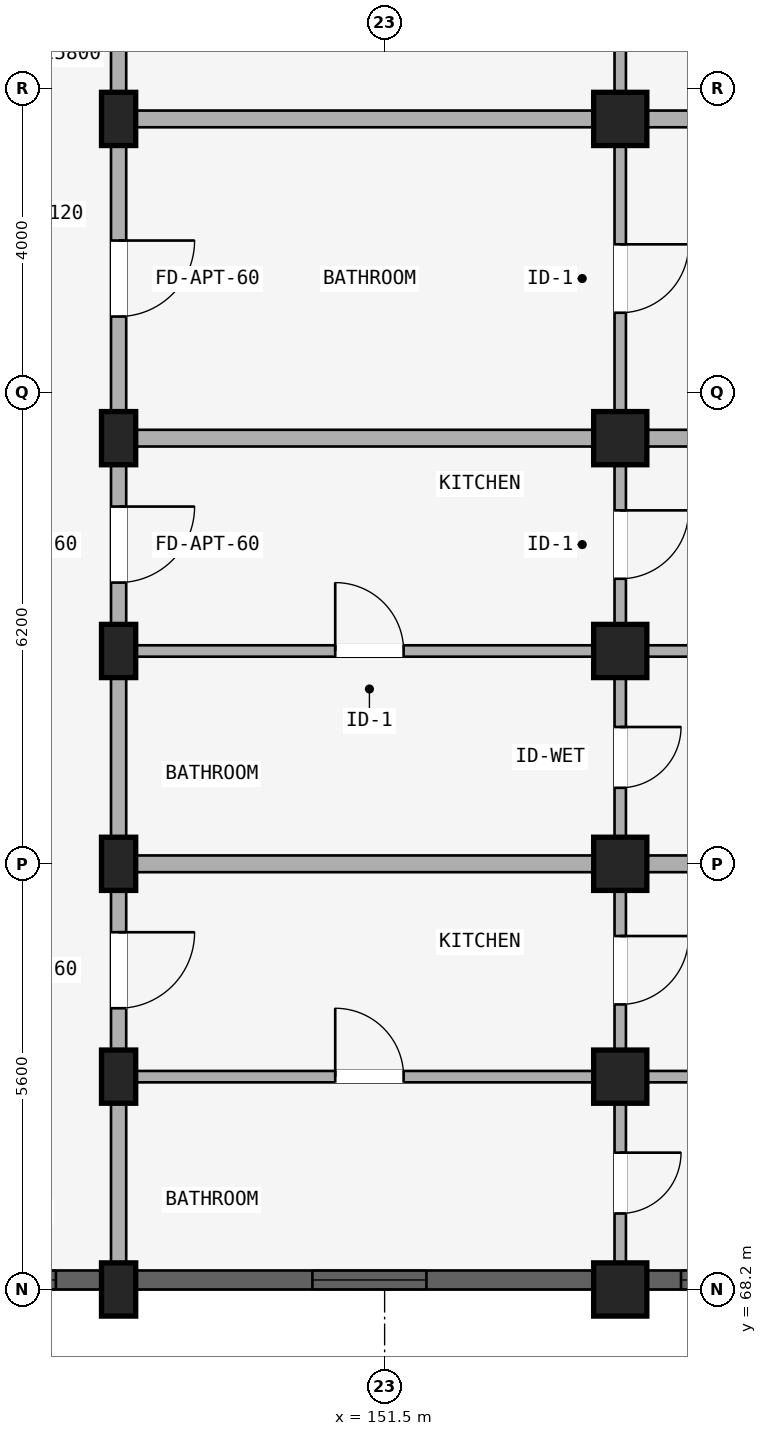
"""IFC4 building model, lengths in metres.
Left out: names, types, materials, properties, quantities, classifications, styles, units other than length and angle.
Written with IfcOpenShell. Run it as: python <this file> out.ifc"""

import sys

from ifc_helpers import new_model, si_unit, direction, frame, frame_2d, origin, origin_2d, place, context, subcontext, project, spatial, rectangle, extrude, element, fill, save


model = new_model("IFC4")
c1 = context("Model", 3, precision=1e-05, world=origin(), true_north=direction((0.0, 1.0)))
c2 = subcontext(c1, "Body", "Model", "MODEL_VIEW")
j1 = project(units=[si_unit("LENGTHUNIT", "METRE"), si_unit("PLANEANGLEUNIT", "RADIAN")], contexts=[c1])
p1 = place(None, origin())
s1 = spatial("IfcSite", under=j1, at=p1, CompositionType="ELEMENT")
p2 = place(p1, origin())
s2 = spatial("IfcBuilding", under=s1, at=p2, CompositionType="ELEMENT")
p3 = place(p2, frame((0.0, 0.0, 21.3)))
s3 = spatial("IfcBuildingStorey", under=s2, at=p3, CompositionType="ELEMENT", Elevation=21.3)
p4 = place(p3, frame((148.0, 83.6, 0.0), z_axis=(0.0, 0.0, 1.0), x_axis=(1.0, 0.0, 0.0)))
e1 = element("IfcColumn", 1, at=p4, inside=s3, PredefinedType="COLUMN", context=c2, shape_type="SweptSolid", body=[
    extrude(rectangle(XDim=0.45, YDim=0.7, at=origin_2d()), origin(), (0.0, 0.0, 1.0), 2.93),
])
p5 = place(p3, frame((154.6, 83.6, 0.0), z_axis=(0.0, 0.0, 1.0), x_axis=(1.0, 0.0, 0.0)))
e2 = element("IfcColumn", 2, at=p5, inside=s3, PredefinedType="COLUMN", context=c2, shape_type="SweptSolid", body=[
    extrude(rectangle(XDim=0.7, YDim=0.7, at=origin_2d()), origin(), (0.0, 0.0, 1.0), 2.93),
])
p6 = place(p3, frame((148.0, 79.4, 0.0), z_axis=(0.0, 0.0, 1.0), x_axis=(1.0, 0.0, 0.0)))
e3 = element("IfcColumn", 3, at=p6, inside=s3, PredefinedType="COLUMN", context=c2, shape_type="SweptSolid", body=[
    extrude(rectangle(XDim=0.45, YDim=0.7, at=origin_2d()), origin(), (0.0, 0.0, 1.0), 2.93),
])
p7 = place(p3, frame((154.6, 79.4, 0.0), z_axis=(0.0, 0.0, 1.0), x_axis=(1.0, 0.0, 0.0)))
e4 = element("IfcColumn", 4, at=p7, inside=s3, PredefinedType="COLUMN", context=c2, shape_type="SweptSolid", body=[
    extrude(rectangle(XDim=0.7, YDim=0.7, at=origin_2d()), origin(), (0.0, 0.0, 1.0), 2.93),
])
p8 = place(p3, frame((148.0, 76.6, 0.0), z_axis=(0.0, 0.0, 1.0), x_axis=(1.0, 0.0, 0.0)))
e5 = element("IfcColumn", 5, at=p8, inside=s3, PredefinedType="COLUMN", context=c2, shape_type="SweptSolid", body=[
    extrude(rectangle(XDim=0.45, YDim=0.7, at=origin_2d()), origin(), (0.0, 0.0, 1.0), 2.93),
])
p9 = place(p3, frame((154.6, 76.6, 0.0), z_axis=(0.0, 0.0, 1.0), x_axis=(1.0, 0.0, 0.0)))
e6 = element("IfcColumn", 6, at=p9, inside=s3, PredefinedType="COLUMN", context=c2, shape_type="SweptSolid", body=[
    extrude(rectangle(XDim=0.7, YDim=0.7, at=origin_2d()), origin(), (0.0, 0.0, 1.0), 2.93),
])
p10 = place(p3, frame((148.0, 73.8, 0.0), z_axis=(0.0, 0.0, 1.0), x_axis=(1.0, 0.0, 0.0)))
e7 = element("IfcColumn", 7, at=p10, inside=s3, PredefinedType="COLUMN", context=c2, shape_type="SweptSolid", body=[
    extrude(rectangle(XDim=0.45, YDim=0.7, at=origin_2d()), origin(), (0.0, 0.0, 1.0), 2.93),
])
p11 = place(p3, frame((154.6, 73.8, 0.0), z_axis=(0.0, 0.0, 1.0), x_axis=(1.0, 0.0, 0.0)))
e8 = element("IfcColumn", 8, at=p11, inside=s3, PredefinedType="COLUMN", context=c2, shape_type="SweptSolid", body=[
    extrude(rectangle(XDim=0.7, YDim=0.7, at=origin_2d()), origin(), (0.0, 0.0, 1.0), 2.93),
])
p12 = place(p3, frame((148.0, 71.0, 0.0), z_axis=(0.0, 0.0, 1.0), x_axis=(1.0, 0.0, 0.0)))
e9 = element("IfcColumn", 9, at=p12, inside=s3, PredefinedType="COLUMN", context=c2, shape_type="SweptSolid", body=[
    extrude(rectangle(XDim=0.45, YDim=0.7, at=origin_2d()), origin(), (0.0, 0.0, 1.0), 2.93),
])
p13 = place(p3, frame((154.6, 71.0, 0.0), z_axis=(0.0, 0.0, 1.0), x_axis=(1.0, 0.0, 0.0)))
e10 = element("IfcColumn", 10, at=p13, inside=s3, PredefinedType="COLUMN", context=c2, shape_type="SweptSolid", body=[
    extrude(rectangle(XDim=0.7, YDim=0.7, at=origin_2d()), origin(), (0.0, 0.0, 1.0), 2.93),
])
p14 = place(p3, frame((148.0, 68.2, 0.0), z_axis=(0.0, 0.0, 1.0), x_axis=(1.0, 0.0, 0.0)))
e11 = element("IfcColumn", 11, at=p14, inside=s3, PredefinedType="COLUMN", context=c2, shape_type="SweptSolid", body=[
    extrude(rectangle(XDim=0.45, YDim=0.7, at=origin_2d()), origin(), (0.0, 0.0, 1.0), 2.93),
])
p15 = place(p3, frame((154.6, 68.2, 0.0), z_axis=(0.0, 0.0, 1.0), x_axis=(1.0, 0.0, 0.0)))
e12 = element("IfcColumn", 12, at=p15, inside=s3, PredefinedType="COLUMN", context=c2, shape_type="SweptSolid", body=[
    extrude(rectangle(XDim=0.7, YDim=0.7, at=origin_2d()), origin(), (0.0, 0.0, 1.0), 2.93),
])
p16 = place(p3, frame((148.0, 87.65, 0.0), z_axis=(0.0, 0.0, 1.0), x_axis=(0.0, -1.0, 0.0)))
e13 = element("IfcWall", 13, at=p16, inside=s3, PredefinedType="STANDARD", context=c2, shape_type="SweptSolid", body=[
    extrude(rectangle(XDim=4.05, YDim=0.2, at=frame_2d((2.025, 0.0))), origin(), (0.0, 0.0, 1.0), 2.372),
])
p17 = place(p16, frame((1.525, 0.0, 0.0)))
e14 = element("IfcOpeningElement", 14, at=p17, cuts=e13, PredefinedType="OPENING", context=c2, shape_type="SweptSolid", body=[
    extrude(rectangle(XDim=1.0, YDim=2.15, at=frame_2d((0.5, 1.075))), frame((0.0, 0.11, 0.0), z_axis=(0.0, -1.0, 0.0), x_axis=(1.0, 0.0, 0.0)), (0.0, 0.0, 1.0), 0.22),
])
p18 = place(p3, frame((154.6, 87.57, 0.0), z_axis=(0.0, 0.0, 1.0), x_axis=(0.0, -1.0, 0.0)))
e15 = element("IfcWall", 15, at=p18, inside=s3, PredefinedType="PARTITIONING", context=c2, shape_type="SweptSolid", body=[
    extrude(rectangle(XDim=3.89, YDim=0.15, at=frame_2d((1.945, 0.0))), origin(), (0.0, 0.0, 1.0), 2.372),
])
p19 = place(p18, frame((1.495, 0.0, 0.0)))
e16 = element("IfcOpeningElement", 16, at=p19, cuts=e15, PredefinedType="OPENING", context=c2, shape_type="SweptSolid", body=[
    extrude(rectangle(XDim=0.9, YDim=2.1, at=frame_2d((0.45, 1.05))), frame((0.0, 0.085, 0.0), z_axis=(0.0, -1.0, 0.0), x_axis=(1.0, 0.0, 0.0)), (0.0, 0.0, 1.0), 0.17),
])
p20 = place(p3, frame((148.0, 83.6, 0.0), z_axis=(0.0, 0.0, 1.0), x_axis=(0.0, -1.0, 0.0)))
e17 = element("IfcWall", 17, at=p20, inside=s3, PredefinedType="STANDARD", context=c2, shape_type="SweptSolid", body=[
    extrude(rectangle(XDim=4.2, YDim=0.2, at=frame_2d((2.1, 0.0))), origin(), (0.0, 0.0, 1.0), 2.372),
])
p21 = place(p20, frame((1.6, 0.0, 0.0)))
e18 = element("IfcOpeningElement", 18, at=p21, cuts=e17, PredefinedType="OPENING", context=c2, shape_type="SweptSolid", body=[
    extrude(rectangle(XDim=1.0, YDim=2.15, at=frame_2d((0.5, 1.075))), frame((0.0, 0.11, 0.0), z_axis=(0.0, -1.0, 0.0), x_axis=(1.0, 0.0, 0.0)), (0.0, 0.0, 1.0), 0.22),
])
p22 = place(p3, frame((154.6, 83.52, 0.0), z_axis=(0.0, 0.0, 1.0), x_axis=(0.0, -1.0, 0.0)))
e19 = element("IfcWall", 19, at=p22, inside=s3, PredefinedType="PARTITIONING", context=c2, shape_type="SweptSolid", body=[
    extrude(rectangle(XDim=4.04, YDim=0.15, at=frame_2d((2.02, 0.0))), origin(), (0.0, 0.0, 1.0), 2.372),
])
p23 = place(p22, frame((1.57, 0.0, 0.0)))
e20 = element("IfcOpeningElement", 20, at=p23, cuts=e19, PredefinedType="OPENING", context=c2, shape_type="SweptSolid", body=[
    extrude(rectangle(XDim=0.9, YDim=2.1, at=frame_2d((0.45, 1.05))), frame((0.0, 0.085, 0.0), z_axis=(0.0, -1.0, 0.0), x_axis=(1.0, 0.0, 0.0)), (0.0, 0.0, 1.0), 0.17),
])
p24 = place(p3, frame((148.05, 83.6, 0.0), z_axis=(0.0, 0.0, 1.0), x_axis=(1.0, 0.0, 0.0)))
e21 = element("IfcWall", 21, at=p24, inside=s3, PredefinedType="STANDARD", context=c2, shape_type="SweptSolid", body=[
    extrude(rectangle(XDim=17.53, YDim=0.22, at=frame_2d((8.765, 0.0))), origin(), (0.0, 0.0, 1.0), 2.372),
])
p25 = place(p3, frame((148.0, 79.4, 0.0), z_axis=(0.0, 0.0, 1.0), x_axis=(0.0, -1.0, 0.0)))
e22 = element("IfcWall", 22, at=p25, inside=s3, PredefinedType="STANDARD", context=c2, shape_type="SweptSolid", body=[
    extrude(rectangle(XDim=2.8, YDim=0.2, at=frame_2d((1.4, 0.0))), origin(), (0.0, 0.0, 1.0), 2.372),
])
p26 = place(p25, frame((0.9, 0.0, 0.0)))
e23 = element("IfcOpeningElement", 23, at=p26, cuts=e22, PredefinedType="OPENING", context=c2, shape_type="SweptSolid", body=[
    extrude(rectangle(XDim=1.0, YDim=2.15, at=frame_2d((0.5, 1.075))), frame((0.0, 0.11, 0.0), z_axis=(0.0, -1.0, 0.0), x_axis=(1.0, 0.0, 0.0)), (0.0, 0.0, 1.0), 0.22),
])
p27 = place(p3, frame((154.6, 79.32, 0.0), z_axis=(0.0, 0.0, 1.0), x_axis=(0.0, -1.0, 0.0)))
e24 = element("IfcWall", 24, at=p27, inside=s3, PredefinedType="PLUMBINGWALL", context=c2, shape_type="SweptSolid", body=[
    extrude(rectangle(XDim=2.64, YDim=0.15, at=frame_2d((1.32, 0.0))), origin(), (0.0, 0.0, 1.0), 2.372),
])
p28 = place(p27, frame((0.87, 0.0, 0.0)))
e25 = element("IfcOpeningElement", 25, at=p28, cuts=e24, PredefinedType="OPENING", context=c2, shape_type="SweptSolid", body=[
    extrude(rectangle(XDim=0.9, YDim=2.1, at=frame_2d((0.45, 1.05))), frame((0.0, 0.085, 0.0), z_axis=(0.0, -1.0, 0.0), x_axis=(1.0, 0.0, 0.0)), (0.0, 0.0, 1.0), 0.17),
])
p29 = place(p3, frame((148.1, 79.4, 0.0), z_axis=(0.0, 0.0, 1.0), x_axis=(1.0, 0.0, 0.0)))
e26 = element("IfcWall", 26, at=p29, inside=s3, PredefinedType="STANDARD", context=c2, shape_type="SweptSolid", body=[
    extrude(rectangle(XDim=17.42, YDim=0.22, at=frame_2d((8.71, 0.0))), origin(), (0.0, 0.0, 1.0), 2.372),
])
p30 = place(p3, frame((148.0, 76.6, 0.0), z_axis=(0.0, 0.0, 1.0), x_axis=(0.0, -1.0, 0.0)))
e27 = element("IfcWall", 27, at=p30, inside=s3, PredefinedType="STANDARD", context=c2, shape_type="SweptSolid", body=[
    extrude(rectangle(XDim=2.8, YDim=0.2, at=frame_2d((1.4, 0.0))), origin(), (0.0, 0.0, 1.0), 2.372),
])
p31 = place(p3, frame((154.6, 76.52, 0.0), z_axis=(0.0, 0.0, 1.0), x_axis=(0.0, -1.0, 0.0)))
e28 = element("IfcWall", 28, at=p31, inside=s3, PredefinedType="PLUMBINGWALL", context=c2, shape_type="SweptSolid", body=[
    extrude(rectangle(XDim=2.64, YDim=0.15, at=frame_2d((1.32, 0.0))), origin(), (0.0, 0.0, 1.0), 2.372),
])
p32 = place(p31, frame((0.92, 0.0, 0.0)))
e29 = element("IfcOpeningElement", 29, at=p32, cuts=e28, PredefinedType="OPENING", context=c2, shape_type="SweptSolid", body=[
    extrude(rectangle(XDim=0.8, YDim=2.1, at=frame_2d((0.4, 1.05))), frame((0.0, 0.085, 0.0), z_axis=(0.0, -1.0, 0.0), x_axis=(1.0, 0.0, 0.0)), (0.0, 0.0, 1.0), 0.17),
])
p33 = place(p3, frame((148.1, 76.6, 0.0), z_axis=(0.0, 0.0, 1.0), x_axis=(1.0, 0.0, 0.0)))
e30 = element("IfcWall", 30, at=p33, inside=s3, PredefinedType="PARTITIONING", context=c2, shape_type="SweptSolid", body=[
    extrude(rectangle(XDim=17.42, YDim=0.15, at=frame_2d((8.71, 0.0))), origin(), (0.0, 0.0, 1.0), 2.372),
])
p34 = place(p33, frame((2.75, 0.0, 0.0)))
e31 = element("IfcOpeningElement", 31, at=p34, cuts=e30, PredefinedType="OPENING", context=c2, shape_type="SweptSolid", body=[
    extrude(rectangle(XDim=0.9, YDim=2.1, at=frame_2d((0.45, 1.05))), frame((0.0, 0.085, 0.0), z_axis=(0.0, -1.0, 0.0), x_axis=(1.0, 0.0, 0.0)), (0.0, 0.0, 1.0), 0.17),
])
p35 = place(p3, frame((148.0, 73.8, 0.0), z_axis=(0.0, 0.0, 1.0), x_axis=(0.0, -1.0, 0.0)))
e32 = element("IfcWall", 32, at=p35, inside=s3, PredefinedType="STANDARD", context=c2, shape_type="SweptSolid", body=[
    extrude(rectangle(XDim=2.8, YDim=0.2, at=frame_2d((1.4, 0.0))), origin(), (0.0, 0.0, 1.0), 2.372),
])
p36 = place(p35, frame((0.9, 0.0, 0.0)))
e33 = element("IfcOpeningElement", 33, at=p36, cuts=e32, PredefinedType="OPENING", context=c2, shape_type="SweptSolid", body=[
    extrude(rectangle(XDim=1.0, YDim=2.15, at=frame_2d((0.5, 1.075))), frame((0.0, 0.11, 0.0), z_axis=(0.0, -1.0, 0.0), x_axis=(1.0, 0.0, 0.0)), (0.0, 0.0, 1.0), 0.22),
])
p37 = place(p3, frame((154.6, 73.72, 0.0), z_axis=(0.0, 0.0, 1.0), x_axis=(0.0, -1.0, 0.0)))
e34 = element("IfcWall", 34, at=p37, inside=s3, PredefinedType="PLUMBINGWALL", context=c2, shape_type="SweptSolid", body=[
    extrude(rectangle(XDim=2.64, YDim=0.15, at=frame_2d((1.32, 0.0))), origin(), (0.0, 0.0, 1.0), 2.372),
])
p38 = place(p37, frame((0.87, 0.0, 0.0)))
e35 = element("IfcOpeningElement", 35, at=p38, cuts=e34, PredefinedType="OPENING", context=c2, shape_type="SweptSolid", body=[
    extrude(rectangle(XDim=0.9, YDim=2.1, at=frame_2d((0.45, 1.05))), frame((0.0, 0.085, 0.0), z_axis=(0.0, -1.0, 0.0), x_axis=(1.0, 0.0, 0.0)), (0.0, 0.0, 1.0), 0.17),
])
p39 = place(p3, frame((148.1, 73.8, 0.0), z_axis=(0.0, 0.0, 1.0), x_axis=(1.0, 0.0, 0.0)))
e36 = element("IfcWall", 36, at=p39, inside=s3, PredefinedType="STANDARD", context=c2, shape_type="SweptSolid", body=[
    extrude(rectangle(XDim=17.42, YDim=0.22, at=frame_2d((8.71, 0.0))), origin(), (0.0, 0.0, 1.0), 2.372),
])
p40 = place(p3, frame((148.0, 71.0, 0.0), z_axis=(0.0, 0.0, 1.0), x_axis=(0.0, -1.0, 0.0)))
e37 = element("IfcWall", 37, at=p40, inside=s3, PredefinedType="STANDARD", context=c2, shape_type="SweptSolid", body=[
    extrude(rectangle(XDim=2.8, YDim=0.2, at=frame_2d((1.4, 0.0))), origin(), (0.0, 0.0, 1.0), 2.372),
])
p41 = place(p3, frame((154.6, 70.92, 0.0), z_axis=(0.0, 0.0, 1.0), x_axis=(0.0, -1.0, 0.0)))
e38 = element("IfcWall", 38, at=p41, inside=s3, PredefinedType="PLUMBINGWALL", context=c2, shape_type="SweptSolid", body=[
    extrude(rectangle(XDim=2.64, YDim=0.15, at=frame_2d((1.32, 0.0))), origin(), (0.0, 0.0, 1.0), 2.372),
])
p42 = place(p41, frame((0.92, 0.0, 0.0)))
e39 = element("IfcOpeningElement", 39, at=p42, cuts=e38, PredefinedType="OPENING", context=c2, shape_type="SweptSolid", body=[
    extrude(rectangle(XDim=0.8, YDim=2.1, at=frame_2d((0.4, 1.05))), frame((0.0, 0.085, 0.0), z_axis=(0.0, -1.0, 0.0), x_axis=(1.0, 0.0, 0.0)), (0.0, 0.0, 1.0), 0.17),
])
p43 = place(p3, frame((148.1, 71.0, 0.0), z_axis=(0.0, 0.0, 1.0), x_axis=(1.0, 0.0, 0.0)))
e40 = element("IfcWall", 40, at=p43, inside=s3, PredefinedType="PARTITIONING", context=c2, shape_type="SweptSolid", body=[
    extrude(rectangle(XDim=17.42, YDim=0.15, at=frame_2d((8.71, 0.0))), origin(), (0.0, 0.0, 1.0), 2.372),
])
p44 = place(p43, frame((2.75, 0.0, 0.0)))
e41 = element("IfcOpeningElement", 41, at=p44, cuts=e40, PredefinedType="OPENING", context=c2, shape_type="SweptSolid", body=[
    extrude(rectangle(XDim=0.9, YDim=2.1, at=frame_2d((0.45, 1.05))), frame((0.0, 0.085, 0.0), z_axis=(0.0, -1.0, 0.0), x_axis=(1.0, 0.0, 0.0)), (0.0, 0.0, 1.0), 0.17),
])
p45 = place(p3, frame((145.829, 68.325, 0.0), z_axis=(0.0, 0.0, 1.0), x_axis=(1.0, 0.0, 0.0)))
e42 = element("IfcWall", 42, at=p45, inside=s3, PredefinedType="STANDARD", context=c2, shape_type="SweptSolid", body=[
    extrude(rectangle(XDim=1.943, YDim=0.25, at=frame_2d((0.971, 0.0))), origin(), (0.0, 0.0, 1.0), 2.372),
])
p46 = place(p45, frame((0.596, 0.0, 0.88)))
e43 = element("IfcOpeningElement", 43, at=p46, cuts=e42, PredefinedType="OPENING", context=c2, shape_type="SweptSolid", body=[
    extrude(rectangle(XDim=0.75, YDim=1.05, at=frame_2d((0.375, 0.525))), frame((0.0, 0.135, 0.0), z_axis=(0.0, -1.0, 0.0), x_axis=(1.0, 0.0, 0.0)), (0.0, 0.0, 1.0), 0.27),
])
p47 = place(p3, frame((148.229, 68.325, 0.0), z_axis=(0.0, 0.0, 1.0), x_axis=(1.0, 0.0, 0.0)))
e44 = element("IfcWall", 44, at=p47, inside=s3, PredefinedType="STANDARD", context=c2, shape_type="SweptSolid", body=[
    extrude(rectangle(XDim=6.018, YDim=0.25, at=frame_2d((3.009, 0.0))), origin(), (0.0, 0.0, 1.0), 2.372),
])
p48 = place(p47, frame((2.322, 0.0, 0.522)))
e45 = element("IfcOpeningElement", 45, at=p48, cuts=e44, PredefinedType="OPENING", context=c2, shape_type="SweptSolid", body=[
    extrude(rectangle(XDim=1.5, YDim=1.65, at=frame_2d((0.75, 0.825))), frame((0.0, 0.135, 0.0), z_axis=(0.0, -1.0, 0.0), x_axis=(1.0, 0.0, 0.0)), (0.0, 0.0, 1.0), 0.27),
])
p49 = place(p3, frame((154.954, 68.325, 0.0), z_axis=(0.0, 0.0, 1.0), x_axis=(1.0, 0.0, 0.0)))
e46 = element("IfcWall", 46, at=p49, inside=s3, PredefinedType="STANDARD", context=c2, shape_type="SweptSolid", body=[
    extrude(rectangle(XDim=2.093, YDim=0.25, at=frame_2d((1.046, 0.0))), origin(), (0.0, 0.0, 1.0), 2.372),
])
p50 = place(p49, frame((0.447, 0.0, 0.672)))
e47 = element("IfcOpeningElement", 47, at=p50, cuts=e46, PredefinedType="OPENING", context=c2, shape_type="SweptSolid", body=[
    extrude(rectangle(XDim=1.2, YDim=1.5, at=frame_2d((0.6, 0.75))), frame((0.0, 0.135, 0.0), z_axis=(0.0, -1.0, 0.0), x_axis=(1.0, 0.0, 0.0)), (0.0, 0.0, 1.0), 0.27),
])
p51 = place(p46, origin())
e48 = element("IfcWindow", 48, at=p51, inside=s3, PartitioningType="SINGLE_PANEL", PredefinedType="WINDOW", context=c2, shape_type="SweptSolid", body=[
    extrude(rectangle(XDim=0.75, YDim=1.05, at=frame_2d((0.375, 0.525))), frame((0.0, 0.03, 0.0), z_axis=(0.0, -1.0, 0.0), x_axis=(1.0, 0.0, 0.0)), (0.0, 0.0, 1.0), 0.06),
])
fill(e43, e48)
p52 = place(p48, origin())
e49 = element("IfcWindow", 49, at=p52, inside=s3, PartitioningType="DOUBLE_PANEL_VERTICAL", PredefinedType="WINDOW", context=c2, shape_type="SweptSolid", body=[
    extrude(rectangle(XDim=1.5, YDim=1.65, at=frame_2d((0.75, 0.825))), frame((0.0, 0.03, 0.0), z_axis=(0.0, -1.0, 0.0), x_axis=(1.0, 0.0, 0.0)), (0.0, 0.0, 1.0), 0.06),
])
fill(e45, e49)
p53 = place(p50, origin())
e50 = element("IfcWindow", 50, at=p53, inside=s3, PartitioningType="SINGLE_PANEL", PredefinedType="WINDOW", context=c2, shape_type="SweptSolid", body=[
    extrude(rectangle(XDim=1.2, YDim=1.5, at=frame_2d((0.6, 0.75))), frame((0.0, 0.03, 0.0), z_axis=(0.0, -1.0, 0.0), x_axis=(1.0, 0.0, 0.0)), (0.0, 0.0, 1.0), 0.06),
])
fill(e47, e50)
p54 = place(p21, frame((1.0, 0.0, 0.0), z_axis=(0.0, 0.0, 1.0), x_axis=(-1.0, 0.0, 0.0)))
e51 = element("IfcDoor", 51, at=p54, inside=s3, OperationType="SINGLE_SWING_RIGHT", PredefinedType="DOOR", context=c2, shape_type="SweptSolid", body=[
    extrude(rectangle(XDim=1.0, YDim=2.15, at=frame_2d((0.5, 1.075))), frame((0.0, 0.025, 0.0), z_axis=(0.0, -1.0, 0.0), x_axis=(1.0, 0.0, 0.0)), (0.0, 0.0, 1.0), 0.05),
])
fill(e18, e51)
p55 = place(p23, origin())
e52 = element("IfcDoor", 52, at=p55, inside=s3, OperationType="SINGLE_SWING_LEFT", PredefinedType="DOOR", context=c2, shape_type="SweptSolid", body=[
    extrude(rectangle(XDim=0.9, YDim=2.1, at=frame_2d((0.45, 1.05))), frame((0.0, 0.025, 0.0), z_axis=(0.0, -1.0, 0.0), x_axis=(1.0, 0.0, 0.0)), (0.0, 0.0, 1.0), 0.05),
])
fill(e20, e52)
p56 = place(p28, origin())
e53 = element("IfcDoor", 53, at=p56, inside=s3, OperationType="SINGLE_SWING_LEFT", PredefinedType="DOOR", context=c2, shape_type="SweptSolid", body=[
    extrude(rectangle(XDim=0.9, YDim=2.1, at=frame_2d((0.45, 1.05))), frame((0.0, 0.025, 0.0), z_axis=(0.0, -1.0, 0.0), x_axis=(1.0, 0.0, 0.0)), (0.0, 0.0, 1.0), 0.05),
])
fill(e25, e53)
p57 = place(p26, frame((1.0, 0.0, 0.0), z_axis=(0.0, 0.0, 1.0), x_axis=(-1.0, 0.0, 0.0)))
e54 = element("IfcDoor", 54, at=p57, inside=s3, OperationType="SINGLE_SWING_RIGHT", PredefinedType="DOOR", context=c2, shape_type="SweptSolid", body=[
    extrude(rectangle(XDim=1.0, YDim=2.15, at=frame_2d((0.5, 1.075))), frame((0.0, 0.025, 0.0), z_axis=(0.0, -1.0, 0.0), x_axis=(1.0, 0.0, 0.0)), (0.0, 0.0, 1.0), 0.05),
])
fill(e23, e54)
p58 = place(p32, origin())
e55 = element("IfcDoor", 55, at=p58, inside=s3, OperationType="SINGLE_SWING_LEFT", PredefinedType="DOOR", context=c2, shape_type="SweptSolid", body=[
    extrude(rectangle(XDim=0.8, YDim=2.1, at=frame_2d((0.4, 1.05))), frame((0.0, 0.025, 0.0), z_axis=(0.0, -1.0, 0.0), x_axis=(1.0, 0.0, 0.0)), (0.0, 0.0, 1.0), 0.05),
])
fill(e29, e55)
p59 = place(p34, origin())
e56 = element("IfcDoor", 56, at=p59, inside=s3, OperationType="SINGLE_SWING_LEFT", PredefinedType="DOOR", context=c2, shape_type="SweptSolid", body=[
    extrude(rectangle(XDim=0.9, YDim=2.1, at=frame_2d((0.45, 1.05))), frame((0.0, 0.025, 0.0), z_axis=(0.0, -1.0, 0.0), x_axis=(1.0, 0.0, 0.0)), (0.0, 0.0, 1.0), 0.05),
])
fill(e31, e56)
p60 = place(p38, origin())
e57 = element("IfcDoor", 57, at=p60, inside=s3, OperationType="SINGLE_SWING_LEFT", PredefinedType="DOOR", context=c2, shape_type="SweptSolid", body=[
    extrude(rectangle(XDim=0.9, YDim=2.1, at=frame_2d((0.45, 1.05))), frame((0.0, 0.025, 0.0), z_axis=(0.0, -1.0, 0.0), x_axis=(1.0, 0.0, 0.0)), (0.0, 0.0, 1.0), 0.05),
])
fill(e35, e57)
p61 = place(p36, frame((1.0, 0.0, 0.0), z_axis=(0.0, 0.0, 1.0), x_axis=(-1.0, 0.0, 0.0)))
e58 = element("IfcDoor", 58, at=p61, inside=s3, OperationType="SINGLE_SWING_RIGHT", PredefinedType="DOOR", context=c2, shape_type="SweptSolid", body=[
    extrude(rectangle(XDim=1.0, YDim=2.15, at=frame_2d((0.5, 1.075))), frame((0.0, 0.025, 0.0), z_axis=(0.0, -1.0, 0.0), x_axis=(1.0, 0.0, 0.0)), (0.0, 0.0, 1.0), 0.05),
])
fill(e33, e58)
p62 = place(p42, origin())
e59 = element("IfcDoor", 59, at=p62, inside=s3, OperationType="SINGLE_SWING_LEFT", PredefinedType="DOOR", context=c2, shape_type="SweptSolid", body=[
    extrude(rectangle(XDim=0.8, YDim=2.1, at=frame_2d((0.4, 1.05))), frame((0.0, 0.025, 0.0), z_axis=(0.0, -1.0, 0.0), x_axis=(1.0, 0.0, 0.0)), (0.0, 0.0, 1.0), 0.05),
])
fill(e39, e59)
p63 = place(p44, origin())
e60 = element("IfcDoor", 60, at=p63, inside=s3, OperationType="SINGLE_SWING_LEFT", PredefinedType="DOOR", context=c2, shape_type="SweptSolid", body=[
    extrude(rectangle(XDim=0.9, YDim=2.1, at=frame_2d((0.45, 1.05))), frame((0.0, 0.025, 0.0), z_axis=(0.0, -1.0, 0.0), x_axis=(1.0, 0.0, 0.0)), (0.0, 0.0, 1.0), 0.05),
])
fill(e41, e60)
save(model, sys.argv[1])
